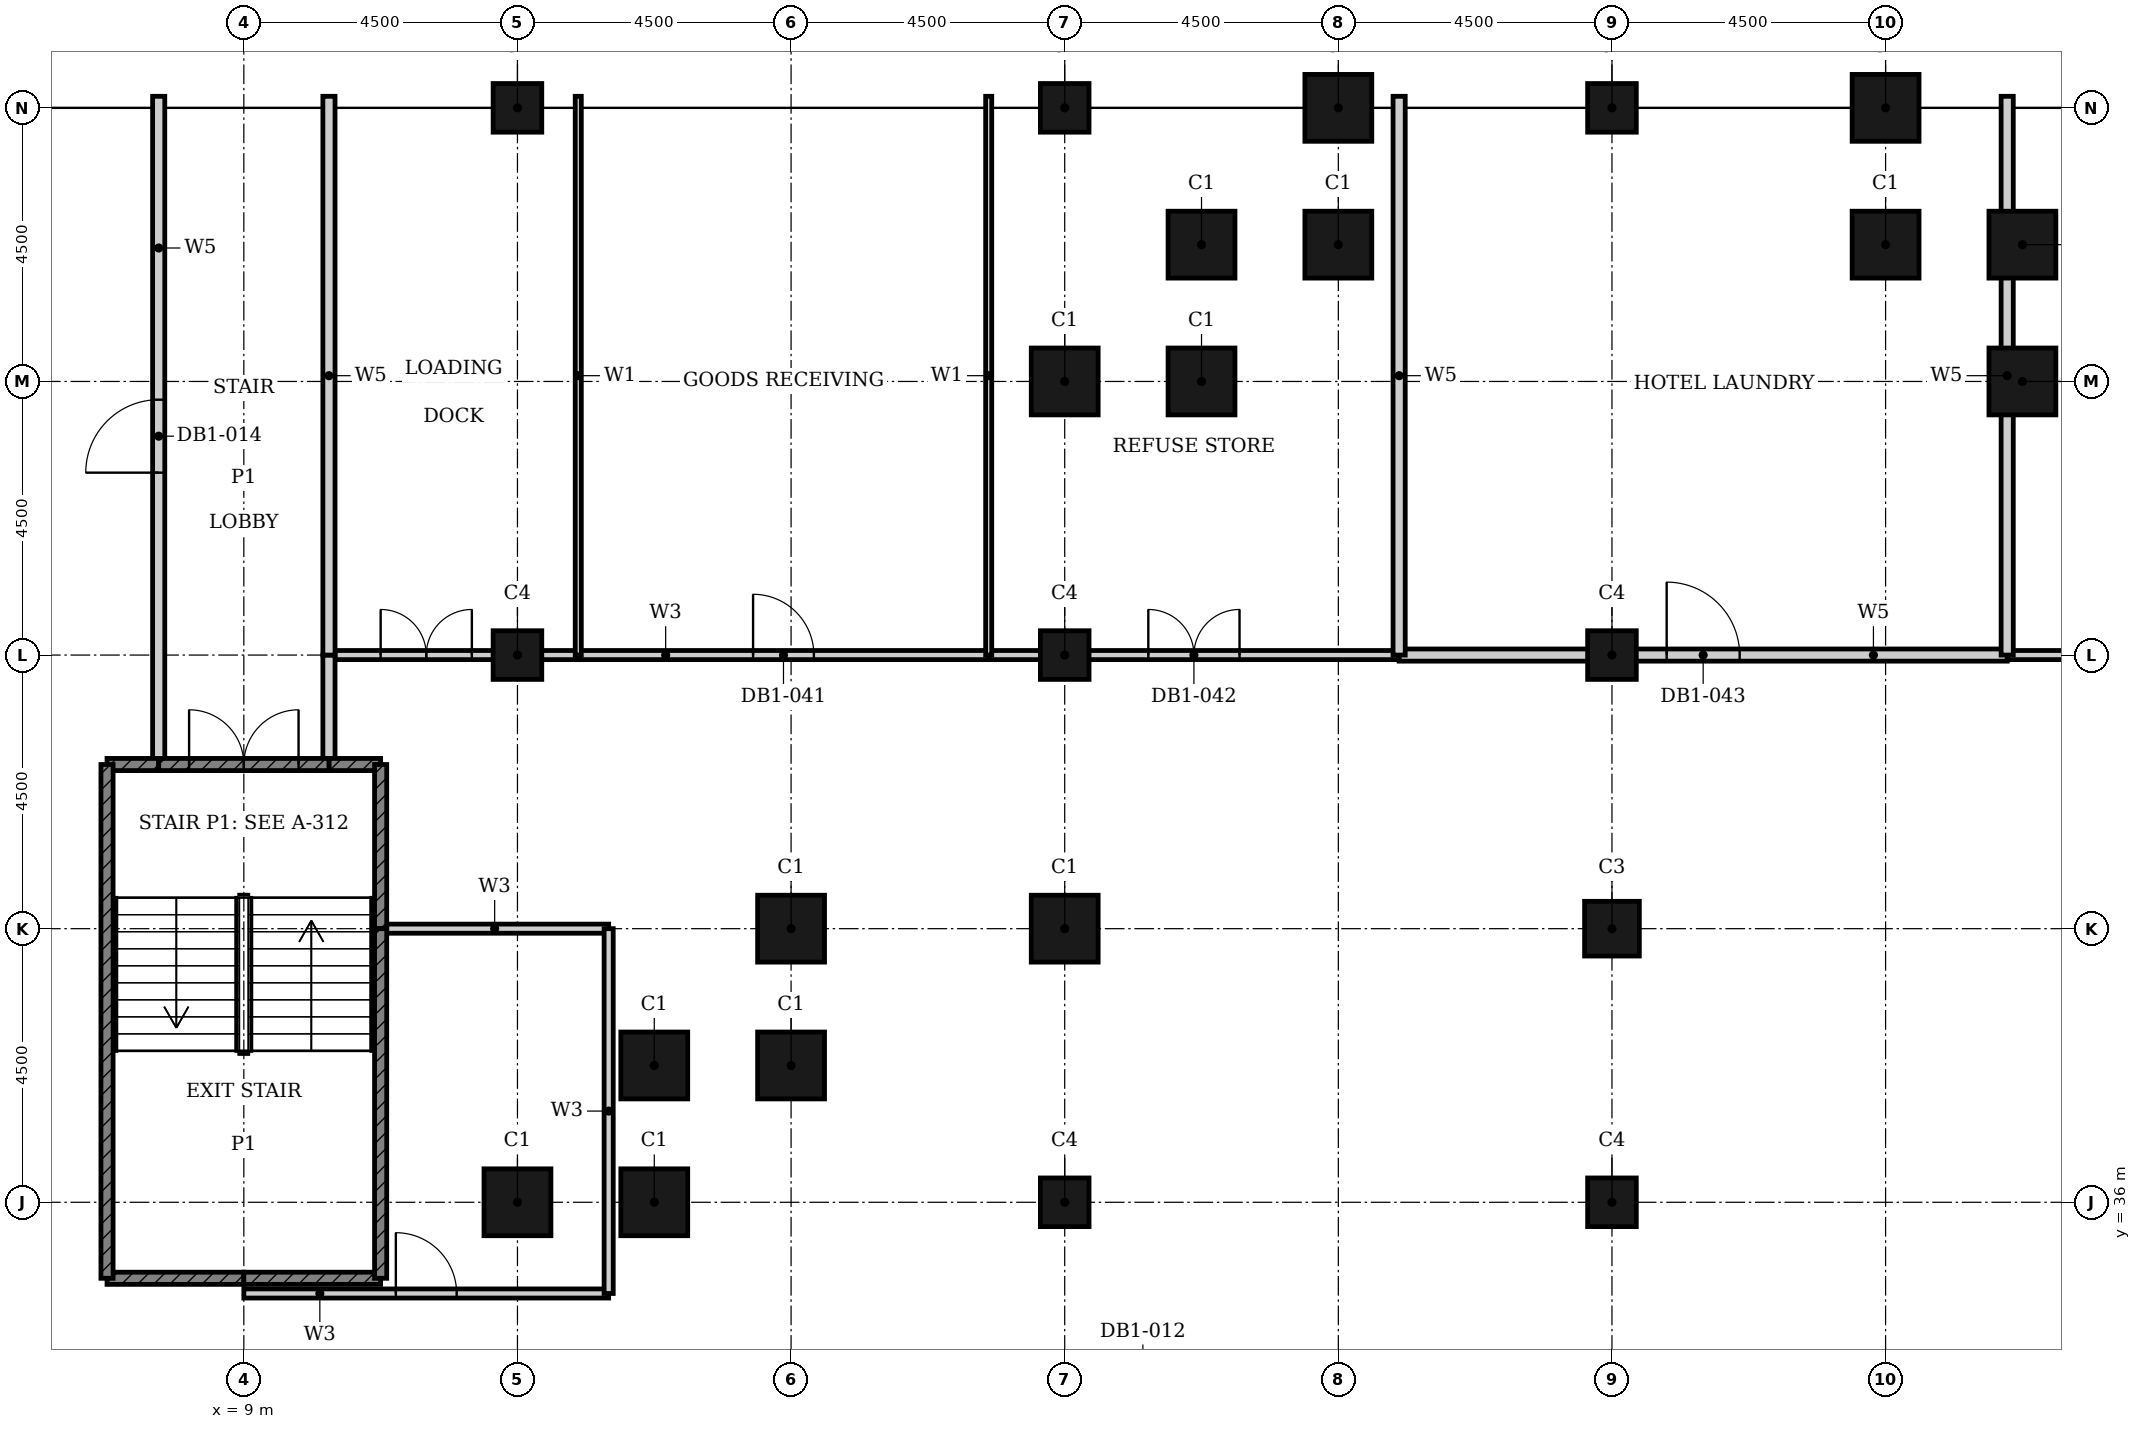
"""IFC4 building model, lengths in metres.
Left out: names, types, materials, properties, quantities, classifications, styles, units other than length and angle.
Written with IfcOpenShell. Run it as: python <this file> out.ifc"""

import sys

from ifc_helpers import new_model, si_unit, direction, frame, frame_2d, origin, origin_2d, place, context, subcontext, project, spatial, rectangle, hollow_rectangle, extrude, element, fill, save


model = new_model("IFC4")
c1 = context("Model", 3, precision=1e-05, world=origin(), true_north=direction((0.0, 1.0)))
c2 = subcontext(c1, "Body", "Model", "MODEL_VIEW")
j1 = project(units=[si_unit("LENGTHUNIT", "METRE"), si_unit("PLANEANGLEUNIT", "RADIAN")], contexts=[c1])
p1 = place(None, origin())
s1 = spatial("IfcSite", under=j1, at=p1, CompositionType="ELEMENT")
p2 = place(p1, origin())
s2 = spatial("IfcBuilding", under=s1, at=p2, CompositionType="ELEMENT")
p3 = place(p2, frame((0.0, 0.0, -6.0)))
s3 = spatial("IfcBuildingStorey", under=s2, at=p3, CompositionType="ELEMENT", Elevation=-6.0)
for number, where, z_axis, x_axis in (
    (1, (38.25, 49.5, -0.5), (0.0, 0.0, 1.0), (1.0, 0.0, 0.0)),
    (2, (38.25, 51.75, -0.5), (0.0, 0.0, 1.0), (1.0, 0.0, 0.0)),
    (3, (36.0, 51.75, -0.5), (0.0, 0.0, 1.0), (1.0, 0.0, 0.0)),
    (4, (36.0, 54.0, -0.5), (0.0, 0.0, 1.0), (1.0, 0.0, 0.0)),
    (5, (27.0, 54.0, -0.5), (0.0, 0.0, 1.0), (1.0, 0.0, 0.0)),
    (6, (27.0, 51.75, -0.5), (0.0, 0.0, 1.0), (1.0, 0.0, 0.0)),
    (7, (24.75, 51.75, -0.5), (0.0, 0.0, 1.0), (1.0, 0.0, 0.0)),
    (8, (24.75, 49.5, -0.5), (0.0, 0.0, 1.0), (1.0, 0.0, 0.0)),
    (9, (22.5, 49.5, -0.5), (0.0, 0.0, 1.0), (1.0, 0.0, 0.0)),
    (10, (22.5, 40.5, -0.5), (0.0, 0.0, 1.0), (1.0, 0.0, 0.0)),
    (11, (18.0, 40.5, -0.5), (0.0, 0.0, 1.0), (1.0, 0.0, 0.0)),
    (12, (18.0, 38.25, -0.5), (0.0, 0.0, 1.0), (1.0, 0.0, 0.0)),
    (13, (15.75, 38.25, -0.5), (0.0, 0.0, 1.0), (1.0, 0.0, 0.0)),
    (14, (15.75, 36.0, -0.5), (0.0, 0.0, 1.0), (1.0, 0.0, 0.0)),
    (15, (13.5, 36.0, -0.5), (0.0, 0.0, 1.0), (1.0, 0.0, 0.0)),
):
    element("IfcColumn", number, at=place(p3, frame(where, z_axis=z_axis, x_axis=x_axis)), inside=s3, PredefinedType="COLUMN", context=c2, shape_type="SweptSolid", body=[
        extrude(hollow_rectangle(XDim=1.1, YDim=1.1, WallThickness=0.036, at=origin_2d()), origin(), (0.0, 0.0, 1.0), 6.5),
    ])
p4 = place(p3, frame((31.5, 40.5, -0.5), z_axis=(0.0, 0.0, 1.0), x_axis=(1.0, 0.0, 0.0)))
e16 = element("IfcColumn", 16, at=p4, inside=s3, PredefinedType="COLUMN", context=c2, shape_type="SweptSolid", body=[
    extrude(hollow_rectangle(XDim=0.9, YDim=0.9, WallThickness=0.028, at=origin_2d()), origin(), (0.0, 0.0, 1.0), 6.5),
])
for number, where, z_axis, x_axis in (
    (17, (13.5, 54.0, -0.5), (0.0, 0.0, 1.0), (1.0, 0.0, 0.0)),
    (18, (22.5, 54.0, -0.5), (0.0, 0.0, 1.0), (1.0, 0.0, 0.0)),
    (19, (31.5, 54.0, -0.5), (0.0, 0.0, 1.0), (1.0, 0.0, 0.0)),
    (20, (13.5, 45.0, -0.5), (0.0, 0.0, 1.0), (1.0, 0.0, 0.0)),
    (21, (22.5, 36.0, -0.5), (0.0, 0.0, 1.0), (1.0, 0.0, 0.0)),
    (22, (22.5, 45.0, -0.5), (0.0, 0.0, 1.0), (1.0, 0.0, 0.0)),
    (23, (31.5, 36.0, -0.5), (0.0, 0.0, 1.0), (1.0, 0.0, 0.0)),
    (24, (31.5, 45.0, -0.5), (0.0, 0.0, 1.0), (1.0, 0.0, 0.0)),
):
    element("IfcColumn", number, at=place(p3, frame(where, z_axis=z_axis, x_axis=x_axis)), inside=s3, PredefinedType="COLUMN", context=c2, shape_type="SweptSolid", body=[
        extrude(hollow_rectangle(XDim=0.8, YDim=0.8, WallThickness=0.025, at=origin_2d()), origin(), (0.0, 0.0, 1.0), 6.5),
    ])
p5 = place(p3, frame((9.0, 34.5, 0.0), z_axis=(0.0, 0.0, 1.0), x_axis=(1.0, 0.0, 0.0)))
e25 = element("IfcWall", 25, at=p5, inside=s3, PredefinedType="PARTITIONING", context=c2, shape_type="SweptSolid", body=[
    extrude(rectangle(XDim=6.0, YDim=0.15, at=frame_2d((3.0, 0.0))), origin(), (0.0, 0.0, 1.0), 5.6),
])
p6 = place(p5, frame((2.5, 0.0, 0.0)))
e26 = element("IfcOpeningElement", 26, at=p6, cuts=e25, PredefinedType="OPENING", context=c2, shape_type="SweptSolid", body=[
    extrude(rectangle(XDim=1.0, YDim=2.1, at=frame_2d((0.5, 1.05))), frame((0.0, 0.085, 0.0), z_axis=(0.0, -1.0, 0.0), x_axis=(1.0, 0.0, 0.0)), (0.0, 0.0, 1.0), 0.17),
])
p7 = place(p3, frame((11.25, 40.5, 0.0), z_axis=(0.0, 0.0, 1.0), x_axis=(1.0, 0.0, 0.0)))
e27 = element("IfcWall", 27, at=p7, inside=s3, PredefinedType="PARTITIONING", context=c2, shape_type="SweptSolid", body=[
    extrude(rectangle(XDim=3.75, YDim=0.15, at=frame_2d((1.875, 0.0))), origin(), (0.0, 0.0, 1.0), 5.6),
])
p8 = place(p3, frame((10.4, 45.0, 0.0), z_axis=(0.0, 0.0, 1.0), x_axis=(1.0, 0.0, 0.0)))
e28 = element("IfcWall", 28, at=p8, inside=s3, PredefinedType="PARTITIONING", context=c2, shape_type="SweptSolid", body=[
    extrude(rectangle(XDim=4.1, YDim=0.15, at=frame_2d((2.05, 0.0))), origin(), (0.0, 0.0, 1.0), 5.6),
])
p9 = place(p8, frame((0.85, 0.0, 0.0)))
e29 = element("IfcOpeningElement", 29, at=p9, cuts=e28, PredefinedType="OPENING", context=c2, shape_type="SweptSolid", body=[
    extrude(rectangle(XDim=1.5, YDim=2.4, at=frame_2d((0.75, 1.2))), frame((0.0, 0.085, 0.0), z_axis=(0.0, -1.0, 0.0), x_axis=(1.0, 0.0, 0.0)), (0.0, 0.0, 1.0), 0.17),
])
p10 = place(p3, frame((14.5, 45.0, 0.0), z_axis=(0.0, 0.0, 1.0), x_axis=(1.0, 0.0, 0.0)))
e30 = element("IfcWall", 30, at=p10, inside=s3, PredefinedType="PARTITIONING", context=c2, shape_type="SweptSolid", body=[
    extrude(rectangle(XDim=6.75, YDim=0.15, at=frame_2d((3.375, 0.0))), origin(), (0.0, 0.0, 1.0), 5.6),
])
p11 = place(p10, frame((2.875, 0.0, 0.0)))
e31 = element("IfcOpeningElement", 31, at=p11, cuts=e30, PredefinedType="OPENING", context=c2, shape_type="SweptSolid", body=[
    extrude(rectangle(XDim=1.0, YDim=2.1, at=frame_2d((0.5, 1.05))), frame((0.0, 0.085, 0.0), z_axis=(0.0, -1.0, 0.0), x_axis=(1.0, 0.0, 0.0)), (0.0, 0.0, 1.0), 0.17),
])
p12 = place(p3, frame((21.25, 45.0, 0.0), z_axis=(0.0, 0.0, 1.0), x_axis=(1.0, 0.0, 0.0)))
e32 = element("IfcWall", 32, at=p12, inside=s3, PredefinedType="PARTITIONING", context=c2, shape_type="SweptSolid", body=[
    extrude(rectangle(XDim=6.75, YDim=0.15, at=frame_2d((3.375, 0.0))), origin(), (0.0, 0.0, 1.0), 5.6),
])
p13 = place(p12, frame((2.625, 0.0, 0.0)))
e33 = element("IfcOpeningElement", 33, at=p13, cuts=e32, PredefinedType="OPENING", context=c2, shape_type="SweptSolid", body=[
    extrude(rectangle(XDim=1.5, YDim=2.4, at=frame_2d((0.75, 1.2))), frame((0.0, 0.085, 0.0), z_axis=(0.0, -1.0, 0.0), x_axis=(1.0, 0.0, 0.0)), (0.0, 0.0, 1.0), 0.17),
])
p14 = place(p3, frame((38.0, 45.0, 0.0), z_axis=(0.0, 0.0, 1.0), x_axis=(1.0, 0.0, 0.0)))
e34 = element("IfcWall", 34, at=p14, inside=s3, PredefinedType="PARTITIONING", context=c2, shape_type="SweptSolid", body=[
    extrude(rectangle(XDim=6.75, YDim=0.15, at=frame_2d((3.375, 0.0))), origin(), (0.0, 0.0, 1.0), 5.6),
])
p15 = place(p14, frame((3.325, 0.0, 0.0)))
e35 = element("IfcOpeningElement", 35, at=p15, cuts=e34, PredefinedType="OPENING", context=c2, shape_type="SweptSolid", body=[
    extrude(rectangle(XDim=1.0, YDim=2.1, at=frame_2d((0.5, 1.05))), frame((0.0, 0.085, 0.0), z_axis=(0.0, -1.0, 0.0), x_axis=(1.0, 0.0, 0.0)), (0.0, 0.0, 1.0), 0.17),
])
p16 = place(p3, frame((15.0, 34.5, 0.0), z_axis=(0.0, 0.0, 1.0), x_axis=(0.0, 1.0, 0.0)))
e36 = element("IfcWall", 36, at=p16, inside=s3, PredefinedType="PARTITIONING", context=c2, shape_type="SweptSolid", body=[
    extrude(rectangle(XDim=6.0, YDim=0.15, at=frame_2d((3.0, 0.0))), origin(), (0.0, 0.0, 1.0), 5.6),
])
for number, where, z_axis, x_axis in (
    (37, (14.5, 45.0, 0.0), (0.0, 0.0, 1.0), (0.0, 1.0, 0.0)),
    (38, (21.25, 45.0, 0.0), (0.0, 0.0, 1.0), (0.0, 1.0, 0.0)),
):
    element("IfcWall", number, at=place(p3, frame(where, z_axis=z_axis, x_axis=x_axis)), inside=s3, PredefinedType="PARTITIONING", context=c2, shape_type="SweptSolid", body=[
        extrude(rectangle(XDim=9.19, YDim=0.1, at=frame_2d((4.595, 0.0))), origin(), (0.0, 0.0, 1.0), 5.6),
    ])
p17 = place(p3, frame((28.0, 45.0, 0.0), z_axis=(0.0, 0.0, 1.0), x_axis=(1.0, 0.0, 0.0)))
e39 = element("IfcWall", 39, at=p17, inside=s3, PredefinedType="PARTITIONING", context=c2, shape_type="SweptSolid", body=[
    extrude(rectangle(XDim=10.0, YDim=0.2, at=frame_2d((5.0, 0.0))), origin(), (0.0, 0.0, 1.0), 5.6),
])
p18 = place(p17, frame((4.4, 0.0, 0.0)))
e40 = element("IfcOpeningElement", 40, at=p18, cuts=e39, PredefinedType="OPENING", context=c2, shape_type="SweptSolid", body=[
    extrude(rectangle(XDim=1.2, YDim=2.1, at=frame_2d((0.6, 1.05))), frame((0.0, 0.11, 0.0), z_axis=(0.0, -1.0, 0.0), x_axis=(1.0, 0.0, 0.0)), (0.0, 0.0, 1.0), 0.22),
])
p19 = place(p3, frame((10.4, 43.2, 0.0), z_axis=(0.0, 0.0, 1.0), x_axis=(0.0, 1.0, 0.0)))
e41 = element("IfcWall", 41, at=p19, inside=s3, PredefinedType="PARTITIONING", context=c2, shape_type="SweptSolid", body=[
    extrude(rectangle(XDim=1.8, YDim=0.2, at=frame_2d((0.9, 0.0))), origin(), (0.0, 0.0, 1.0), 5.6),
])
for number, where, z_axis, x_axis in (
    (42, (10.4, 45.0, 0.0), (0.0, 0.0, 1.0), (0.0, 1.0, 0.0)),
    (43, (28.0, 45.0, 0.0), (0.0, 0.0, 1.0), (0.0, 1.0, 0.0)),
    (44, (38.0, 45.0, 0.0), (0.0, 0.0, 1.0), (0.0, 1.0, 0.0)),
):
    element("IfcWall", number, at=place(p3, frame(where, z_axis=z_axis, x_axis=x_axis)), inside=s3, PredefinedType="PARTITIONING", context=c2, shape_type="SweptSolid", body=[
        extrude(rectangle(XDim=9.19, YDim=0.2, at=frame_2d((4.595, 0.0))), origin(), (0.0, 0.0, 1.0), 5.6),
    ])
p20 = place(p3, frame((7.6, 43.2, 0.0), z_axis=(0.0, 0.0, 1.0), x_axis=(0.0, 1.0, 0.0)))
e45 = element("IfcWall", 45, at=p20, inside=s3, PredefinedType="PARTITIONING", context=c2, shape_type="SweptSolid", body=[
    extrude(rectangle(XDim=10.99, YDim=0.2, at=frame_2d((5.495, 0.0))), origin(), (0.0, 0.0, 1.0), 5.6),
])
p21 = place(p20, frame((4.8, 0.0, 0.0)))
e46 = element("IfcOpeningElement", 46, at=p21, cuts=e45, PredefinedType="OPENING", context=c2, shape_type="SweptSolid", body=[
    extrude(rectangle(XDim=1.2, YDim=2.1, at=frame_2d((0.6, 1.05))), frame((0.0, 0.11, 0.0), z_axis=(0.0, -1.0, 0.0), x_axis=(1.0, 0.0, 0.0)), (0.0, 0.0, 1.0), 0.22),
])
for number, where, z_axis, x_axis in (
    (47, (6.75, 34.75, 0.0), (0.0, 0.0, 1.0), (1.0, 0.0, 0.0)),
    (48, (9.0, 34.75, 0.0), (0.0, 0.0, 1.0), (1.0, 0.0, 0.0)),
):
    element("IfcWall", number, at=place(p3, frame(where, z_axis=z_axis, x_axis=x_axis)), inside=s3, PredefinedType="SHEAR", context=c2, shape_type="SweptSolid", body=[
        extrude(rectangle(XDim=2.25, YDim=0.2, at=frame_2d((1.125, 0.0))), origin(), (0.0, 0.0, 1.0), 5.6),
    ])
for number, where, z_axis, x_axis in (
    (49, (6.75, 43.2, 0.0), (0.0, 0.0, 1.0), (1.0, 0.0, 0.0)),
    (50, (10.4, 43.2, 0.0), (0.0, 0.0, 1.0), (1.0, 0.0, 0.0)),
):
    element("IfcWall", number, at=place(p3, frame(where, z_axis=z_axis, x_axis=x_axis)), inside=s3, PredefinedType="SHEAR", context=c2, shape_type="SweptSolid", body=[
        extrude(rectangle(XDim=0.85, YDim=0.2, at=frame_2d((0.425, 0.0))), origin(), (0.0, 0.0, 1.0), 5.6),
    ])
p22 = place(p3, frame((7.6, 43.2, 0.0), z_axis=(0.0, 0.0, 1.0), x_axis=(1.0, 0.0, 0.0)))
e51 = element("IfcWall", 51, at=p22, inside=s3, PredefinedType="SHEAR", context=c2, shape_type="SweptSolid", body=[
    extrude(rectangle(XDim=2.8, YDim=0.2, at=frame_2d((1.4, 0.0))), origin(), (0.0, 0.0, 1.0), 5.6),
])
p23 = place(p22, frame((0.5, 0.0, 0.0)))
e52 = element("IfcOpeningElement", 52, at=p23, cuts=e51, PredefinedType="OPENING", context=c2, shape_type="SweptSolid", body=[
    extrude(rectangle(XDim=1.8, YDim=2.1, at=frame_2d((0.9, 1.05))), frame((0.0, 0.11, 0.0), z_axis=(0.0, -1.0, 0.0), x_axis=(1.0, 0.0, 0.0)), (0.0, 0.0, 1.0), 0.22),
])
p24 = place(p3, frame((11.25, 40.5, 0.0), z_axis=(0.0, 0.0, 1.0), x_axis=(0.0, 1.0, 0.0)))
e53 = element("IfcWall", 53, at=p24, inside=s3, PredefinedType="SHEAR", context=c2, shape_type="SweptSolid", body=[
    extrude(rectangle(XDim=2.7, YDim=0.2, at=frame_2d((1.35, 0.0))), origin(), (0.0, 0.0, 1.0), 5.6),
])
p25 = place(p3, frame((11.25, 34.75, 0.0), z_axis=(0.0, 0.0, 1.0), x_axis=(0.0, 1.0, 0.0)))
e54 = element("IfcWall", 54, at=p25, inside=s3, PredefinedType="SHEAR", context=c2, shape_type="SweptSolid", body=[
    extrude(rectangle(XDim=5.75, YDim=0.2, at=frame_2d((2.875, 0.0))), origin(), (0.0, 0.0, 1.0), 5.6),
])
p26 = place(p3, frame((6.75, 34.75, 0.0), z_axis=(0.0, 0.0, 1.0), x_axis=(0.0, 1.0, 0.0)))
e55 = element("IfcWall", 55, at=p26, inside=s3, PredefinedType="SHEAR", context=c2, shape_type="SweptSolid", body=[
    extrude(rectangle(XDim=8.45, YDim=0.2, at=frame_2d((4.225, 0.0))), origin(), (0.0, 0.0, 1.0), 5.6),
])
p27 = place(p21, origin())
e56 = element("IfcDoor", 56, at=p27, inside=s3, OperationType="SINGLE_SWING_RIGHT", PredefinedType="DOOR", context=c2, shape_type="SweptSolid", body=[
    extrude(rectangle(XDim=1.2, YDim=2.1, at=frame_2d((0.6, 1.05))), frame((0.0, 0.025, 0.0), z_axis=(0.0, -1.0, 0.0), x_axis=(1.0, 0.0, 0.0)), (0.0, 0.0, 1.0), 0.05),
])
fill(e46, e56)
p28 = place(p23, origin())
e57 = element("IfcDoor", 57, at=p28, inside=s3, OperationType="DOUBLE_DOOR_SINGLE_SWING", PredefinedType="DOOR", context=c2, shape_type="SweptSolid", body=[
    extrude(rectangle(XDim=1.8, YDim=2.1, at=frame_2d((0.9, 1.05))), frame((0.0, 0.025, 0.0), z_axis=(0.0, -1.0, 0.0), x_axis=(1.0, 0.0, 0.0)), (0.0, 0.0, 1.0), 0.05),
])
fill(e52, e57)
p29 = place(p9, origin())
e58 = element("IfcDoor", 58, at=p29, inside=s3, OperationType="DOUBLE_DOOR_SINGLE_SWING", PredefinedType="DOOR", context=c2, shape_type="SweptSolid", body=[
    extrude(rectangle(XDim=1.5, YDim=2.4, at=frame_2d((0.75, 1.2))), frame((0.0, 0.025, 0.0), z_axis=(0.0, -1.0, 0.0), x_axis=(1.0, 0.0, 0.0)), (0.0, 0.0, 1.0), 0.05),
])
fill(e29, e58)
p30 = place(p11, origin())
e59 = element("IfcDoor", 59, at=p30, inside=s3, OperationType="SINGLE_SWING_RIGHT", PredefinedType="DOOR", context=c2, shape_type="SweptSolid", body=[
    extrude(rectangle(XDim=1.0, YDim=2.1, at=frame_2d((0.5, 1.05))), frame((0.0, 0.025, 0.0), z_axis=(0.0, -1.0, 0.0), x_axis=(1.0, 0.0, 0.0)), (0.0, 0.0, 1.0), 0.05),
])
fill(e31, e59)
p31 = place(p13, origin())
e60 = element("IfcDoor", 60, at=p31, inside=s3, OperationType="DOUBLE_DOOR_SINGLE_SWING", PredefinedType="DOOR", context=c2, shape_type="SweptSolid", body=[
    extrude(rectangle(XDim=1.5, YDim=2.4, at=frame_2d((0.75, 1.2))), frame((0.0, 0.025, 0.0), z_axis=(0.0, -1.0, 0.0), x_axis=(1.0, 0.0, 0.0)), (0.0, 0.0, 1.0), 0.05),
])
fill(e33, e60)
p32 = place(p18, origin())
e61 = element("IfcDoor", 61, at=p32, inside=s3, OperationType="SINGLE_SWING_LEFT", PredefinedType="DOOR", context=c2, shape_type="SweptSolid", body=[
    extrude(rectangle(XDim=1.2, YDim=2.1, at=frame_2d((0.6, 1.05))), frame((0.0, 0.025, 0.0), z_axis=(0.0, -1.0, 0.0), x_axis=(1.0, 0.0, 0.0)), (0.0, 0.0, 1.0), 0.05),
])
fill(e40, e61)
p33 = place(p6, origin())
e62 = element("IfcDoor", 62, at=p33, inside=s3, OperationType="SINGLE_SWING_RIGHT", PredefinedType="DOOR", context=c2, shape_type="SweptSolid", body=[
    extrude(rectangle(XDim=1.0, YDim=2.1, at=frame_2d((0.5, 1.05))), frame((0.0, 0.025, 0.0), z_axis=(0.0, -1.0, 0.0), x_axis=(1.0, 0.0, 0.0)), (0.0, 0.0, 1.0), 0.05),
])
fill(e26, e62)
save(model, sys.argv[1])
